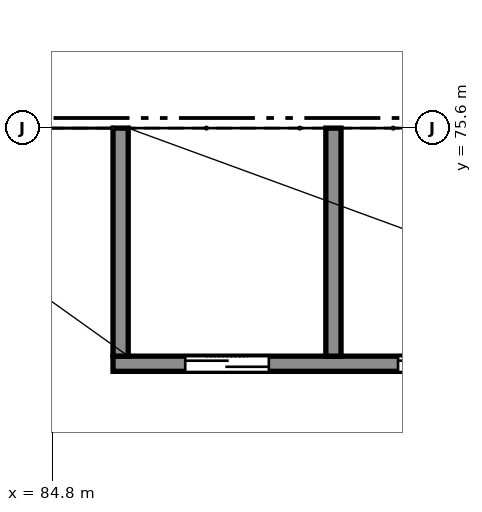
"""IFC4 building model, lengths in metres.
Left out: names, types, materials, properties, quantities, classifications, styles, units other than length and angle.
Written with IfcOpenShell. Run it as: python <this file> out.ifc"""

import sys

from ifc_helpers import new_model, si_unit, direction, frame, frame_2d, origin, place, context, subcontext, project, spatial, rectangle, extrude, element, fill, save


model = new_model("IFC4")
c1 = context("Model", 3, precision=1e-05, world=origin(), true_north=direction((0.0, 1.0)))
c2 = subcontext(c1, "Body", "Model", "MODEL_VIEW")
j1 = project(units=[si_unit("LENGTHUNIT", "METRE"), si_unit("PLANEANGLEUNIT", "RADIAN")], contexts=[c1])
p1 = place(None, origin())
s1 = spatial("IfcSite", under=j1, at=p1, CompositionType="ELEMENT")
p2 = place(p1, origin())
s2 = spatial("IfcBuilding", under=s1, at=p2, CompositionType="ELEMENT")
p3 = place(p2, frame((0.0, 0.0, 25.0)))
s3 = spatial("IfcBuildingStorey", under=s2, at=p3, CompositionType="ELEMENT", Elevation=25.0)
p4 = place(p3, frame((85.6, 72.5, 0.0), z_axis=(0.0, 0.0, 1.0), x_axis=(1.0, 0.0, 0.0)))
e1 = element("IfcWall", 1, at=p4, inside=s3, PredefinedType="SHEAR", context=c2, shape_type="SweptSolid", body=[
    extrude(rectangle(XDim=8.6, YDim=0.2, at=frame_2d((4.3, 0.0))), origin(), (0.0, 0.0, 1.0), 5.0),
])
p5 = place(p4, frame((0.95, 0.0, 0.0)))
e2 = element("IfcOpeningElement", 2, at=p5, cuts=e1, PredefinedType="OPENING", context=c2, shape_type="SweptSolid", body=[
    extrude(rectangle(XDim=1.1, YDim=2.1, at=frame_2d((0.55, 1.05))), frame((0.0, 0.11, 0.0), z_axis=(0.0, -1.0, 0.0), x_axis=(1.0, 0.0, 0.0)), (0.0, 0.0, 1.0), 0.22),
])
p6 = place(p4, frame((3.75, 0.0, 0.0)))
e3 = element("IfcOpeningElement", 3, at=p6, cuts=e1, PredefinedType="OPENING", context=c2, shape_type="SweptSolid", body=[
    extrude(rectangle(XDim=1.1, YDim=2.1, at=frame_2d((0.55, 1.05))), frame((0.0, 0.11, 0.0), z_axis=(0.0, -1.0, 0.0), x_axis=(1.0, 0.0, 0.0)), (0.0, 0.0, 1.0), 0.22),
])
p7 = place(p4, frame((6.55, 0.0, 0.0)))
e4 = element("IfcOpeningElement", 4, at=p7, cuts=e1, PredefinedType="OPENING", context=c2, shape_type="SweptSolid", body=[
    extrude(rectangle(XDim=1.1, YDim=2.1, at=frame_2d((0.55, 1.05))), frame((0.0, 0.11, 0.0), z_axis=(0.0, -1.0, 0.0), x_axis=(1.0, 0.0, 0.0)), (0.0, 0.0, 1.0), 0.22),
])
for number, where, z_axis, x_axis in (
    (5, (85.7, 72.6, 0.0), (0.0, 0.0, 1.0), (0.0, 1.0, 0.0)),
    (6, (88.5, 72.6, 0.0), (0.0, 0.0, 1.0), (0.0, 1.0, 0.0)),
):
    element("IfcWall", number, at=place(p3, frame(where, z_axis=z_axis, x_axis=x_axis)), inside=s3, PredefinedType="SHEAR", context=c2, shape_type="SweptSolid", body=[
        extrude(rectangle(XDim=3.0, YDim=0.2, at=frame_2d((1.5, 0.0))), origin(), (0.0, 0.0, 1.0), 5.0),
    ])
p8 = place(p5, origin())
e7 = element("IfcDoor", 7, at=p8, inside=s3, OperationType="DOUBLE_DOOR_SLIDING", PredefinedType="DOOR", context=c2, shape_type="SweptSolid", body=[
    extrude(rectangle(XDim=1.1, YDim=2.1, at=frame_2d((0.55, 1.05))), frame((0.0, 0.025, 0.0), z_axis=(0.0, -1.0, 0.0), x_axis=(1.0, 0.0, 0.0)), (0.0, 0.0, 1.0), 0.05),
])
fill(e2, e7)
p9 = place(p6, origin())
e8 = element("IfcDoor", 8, at=p9, inside=s3, OperationType="DOUBLE_DOOR_SLIDING", PredefinedType="DOOR", context=c2, shape_type="SweptSolid", body=[
    extrude(rectangle(XDim=1.1, YDim=2.1, at=frame_2d((0.55, 1.05))), frame((0.0, 0.025, 0.0), z_axis=(0.0, -1.0, 0.0), x_axis=(1.0, 0.0, 0.0)), (0.0, 0.0, 1.0), 0.05),
])
fill(e3, e8)
save(model, sys.argv[1])
